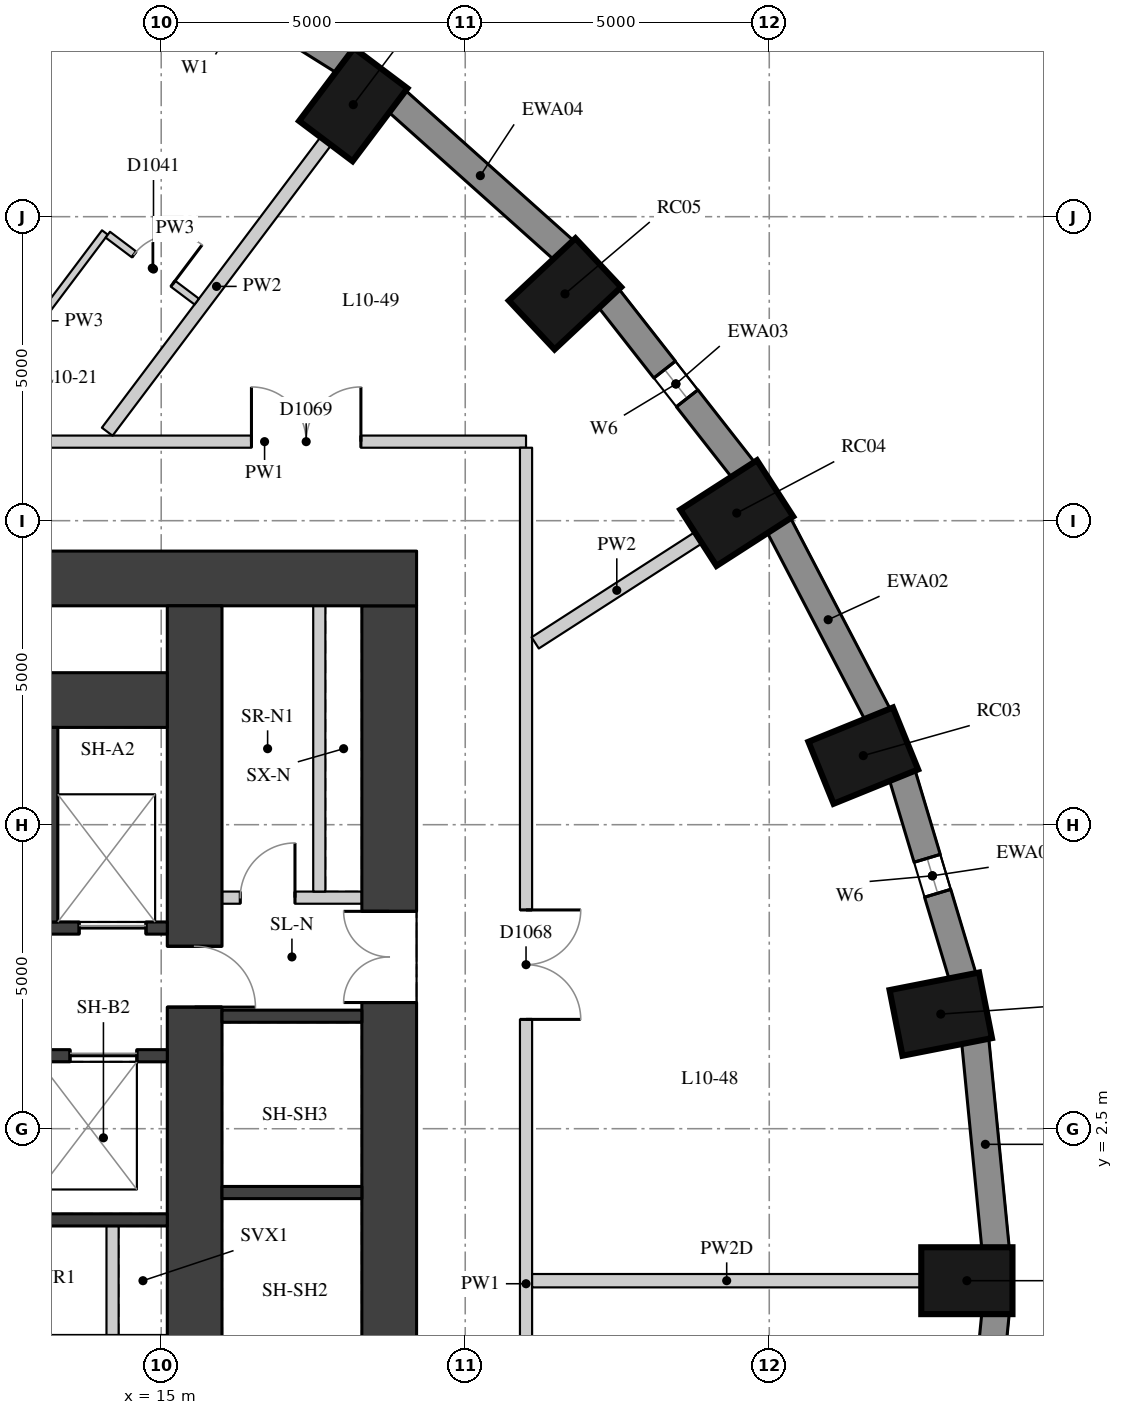
"""IFC4 building model, lengths in metres.
Left out: names, types, materials, properties, quantities, classifications, styles, units other than length and angle.
Written with IfcOpenShell. Run it as: python <this file> out.ifc"""

import sys

from ifc_helpers import new_model, si_unit, direction, frame, frame_2d, origin, origin_2d, place, context, subcontext, project, spatial, rectangle, extrude, element, fill, save


model = new_model("IFC4")
c1 = context("Model", 3, precision=1e-05, world=origin(), true_north=direction((0.0, 1.0)))
c2 = subcontext(c1, "Body", "Model", "MODEL_VIEW")
j1 = project(units=[si_unit("LENGTHUNIT", "METRE"), si_unit("PLANEANGLEUNIT", "RADIAN")], contexts=[c1])
p1 = place(None, origin())
s1 = spatial("IfcSite", under=j1, at=p1, CompositionType="ELEMENT")
p2 = place(p1, origin())
s2 = spatial("IfcBuilding", under=s1, at=p2, CompositionType="ELEMENT")
p3 = place(p2, frame((0.0, 0.0, 41.5)))
s3 = spatial("IfcBuildingStorey", under=s2, at=p3, CompositionType="ELEMENT", Elevation=41.5)
for number, where, z_axis, x_axis in (
    (1, (28.25, 0.0, 0.0), (0.0, 0.0, 1.0), (1.0, 0.0, 0.0)),
    (2, (27.821, 4.385, 0.0), (0.0, 0.0, 1.0), (0.981, 0.193, 0.0)),
    (3, (26.546, 8.636, 0.0), (0.0, 0.0, 1.0), (0.927, 0.376, 0.0)),
    (4, (24.465, 12.625, 0.0), (0.0, 0.0, 1.0), (0.841, 0.541, 0.0)),
    (5, (21.641, 16.23, 0.0), (0.0, 0.0, 1.0), (0.73, 0.683, 0.0)),
    (6, (18.159, 19.343, 0.0), (0.0, 0.0, 1.0), (0.601, 0.799, 0.0)),
):
    element("IfcColumn", number, at=place(p3, frame(where, z_axis=z_axis, x_axis=x_axis)), inside=s3, PredefinedType="COLUMN", context=c2, shape_type="SweptSolid", body=[
        extrude(rectangle(XDim=1.5, YDim=1.1, at=origin_2d()), origin(), (0.0, 0.0, 1.0), 3.3),
    ])
p4 = place(p3, frame((28.722, 0.53, 0.0), z_axis=(0.0, 0.0, 1.0), x_axis=(-0.097389581596, 0.995246336038, 0.0)))
e7 = element("IfcWall", 7, at=p4, inside=s3, PredefinedType="SOLIDWALL", context=c2, shape_type="SweptSolid", body=[
    extrude(rectangle(XDim=3.442, YDim=0.45, at=frame_2d((1.721, 0.0))), origin(), (0.0, 0.0, 1.0), 3.02),
])
p5 = place(p3, frame((28.182, 4.996, 0.0), z_axis=(0.0, 0.0, 1.0), x_axis=(-0.287064133733, 0.957911364963, 0.0)))
e8 = element("IfcWall", 8, at=p5, inside=s3, PredefinedType="SOLIDWALL", context=c2, shape_type="SweptSolid", body=[
    extrude(rectangle(XDim=3.473, YDim=0.45, at=frame_2d((1.737, 0.0))), origin(), (0.0, 0.0, 1.0), 3.02),
])
p6 = place(p5, frame((1.437, 0.0, 0.4)))
e9 = element("IfcOpeningElement", 9, at=p6, cuts=e8, PredefinedType="OPENING", context=c2, shape_type="SweptSolid", body=[
    extrude(rectangle(XDim=0.6, YDim=1.75, at=frame_2d((0.3, 0.875))), frame((0.0, 0.235, 0.0), z_axis=(0.0, -1.0, 0.0), x_axis=(1.0, 0.0, 0.0)), (0.0, 0.0, 1.0), 0.47),
])
p7 = place(p3, frame((26.786, 9.305, 0.0), z_axis=(0.0, 0.0, 1.0), x_axis=(-0.462492775226, 0.886623050041, 0.0)))
e10 = element("IfcWall", 10, at=p7, inside=s3, PredefinedType="SOLIDWALL", context=c2, shape_type="SweptSolid", body=[
    extrude(rectangle(XDim=3.532, YDim=0.45, at=frame_2d((1.766, 0.0))), origin(), (0.0, 0.0, 1.0), 3.02),
])
p8 = place(p3, frame((24.578, 13.328, 0.0), z_axis=(0.0, 0.0, 1.0), x_axis=(-0.616661975264, 0.787228053529, 0.0)))
e11 = element("IfcWall", 11, at=p8, inside=s3, PredefinedType="SOLIDWALL", context=c2, shape_type="SweptSolid", body=[
    extrude(rectangle(XDim=3.61, YDim=0.45, at=frame_2d((1.805, 0.0))), origin(), (0.0, 0.0, 1.0), 3.02),
])
p9 = place(p8, frame((1.505, 0.0, 0.4)))
e12 = element("IfcOpeningElement", 12, at=p9, cuts=e11, PredefinedType="OPENING", context=c2, shape_type="SweptSolid", body=[
    extrude(rectangle(XDim=0.6, YDim=1.75, at=frame_2d((0.3, 0.875))), frame((0.0, 0.235, 0.0), z_axis=(0.0, -1.0, 0.0), x_axis=(1.0, 0.0, 0.0)), (0.0, 0.0, 1.0), 0.47),
])
p10 = place(p3, frame((21.627, 16.943, 0.0), z_axis=(0.0, 0.0, 1.0), x_axis=(-0.745526233716, 0.66647628228, 0.0)))
e13 = element("IfcWall", 13, at=p10, inside=s3, PredefinedType="SOLIDWALL", context=c2, shape_type="SweptSolid", body=[
    extrude(rectangle(XDim=3.697, YDim=0.45, at=frame_2d((1.848, 0.0))), origin(), (0.0, 0.0, 1.0), 3.02),
])
p11 = place(p3, frame((18.023, 20.044, 0.0), z_axis=(0.0, 0.0, 1.0), x_axis=(-0.847635480093, 0.530579016629, 0.0)))
e14 = element("IfcWall", 14, at=p11, inside=s3, PredefinedType="SOLIDWALL", context=c2, shape_type="SweptSolid", body=[
    extrude(rectangle(XDim=3.782, YDim=0.45, at=frame_2d((1.891, 0.0))), origin(), (0.0, 0.0, 1.0), 3.02),
])
p12 = place(p11, frame((0.791, 0.0, 0.4)))
e15 = element("IfcOpeningElement", 15, at=p12, cuts=e14, PredefinedType="OPENING", context=c2, shape_type="SweptSolid", body=[
    extrude(rectangle(XDim=2.2, YDim=1.75, at=frame_2d((1.1, 0.875))), frame((0.0, 0.235, 0.0), z_axis=(0.0, -1.0, 0.0), x_axis=(1.0, 0.0, 0.0)), (0.0, 0.0, 1.0), 0.47),
])
p13 = place(p3, frame((28.387, -3.956, 0.0), z_axis=(0.0, 0.0, 1.0), x_axis=(0.097389581596, 0.995246336038, 0.0)))
e16 = element("IfcWall", 16, at=p13, inside=s3, PredefinedType="SOLIDWALL", context=c2, shape_type="SweptSolid", body=[
    extrude(rectangle(XDim=3.442, YDim=0.45, at=frame_2d((1.721, 0.0))), origin(), (0.0, 0.0, 1.0), 3.02),
])
p14 = place(p13, frame((1.421, 0.0, 0.4)))
e17 = element("IfcOpeningElement", 17, at=p14, cuts=e16, PredefinedType="OPENING", context=c2, shape_type="SweptSolid", body=[
    extrude(rectangle(XDim=0.6, YDim=1.75, at=frame_2d((0.3, 0.875))), frame((0.0, 0.235, 0.0), z_axis=(0.0, -1.0, 0.0), x_axis=(1.0, 0.0, 0.0)), (0.0, 0.0, 1.0), 0.47),
])
p15 = place(p3, frame((18.75, -11.1, 0.0), z_axis=(0.0, 0.0, 1.0), x_axis=(0.0, 1.0, 0.0)))
e18 = element("IfcWall", 18, at=p15, inside=s3, PredefinedType="SHEAR", context=c2, shape_type="SweptSolid", body=[
    extrude(rectangle(XDim=22.2, YDim=0.9, at=frame_2d((11.1, 0.0))), origin(), (0.0, 0.0, 1.0), 3.02),
])
p16 = place(p15, frame((15.675, 0.0, 0.0)))
e19 = element("IfcOpeningElement", 19, at=p16, cuts=e18, PredefinedType="OPENING", context=c2, shape_type="SweptSolid", body=[
    extrude(rectangle(XDim=1.5, YDim=2.1, at=frame_2d((0.75, 1.05))), frame((0.0, 0.46, 0.0), z_axis=(0.0, -1.0, 0.0), x_axis=(1.0, 0.0, 0.0)), (0.0, 0.0, 1.0), 0.92),
])
p17 = place(p15, frame((4.775, 0.0, 0.0)))
e20 = element("IfcOpeningElement", 20, at=p17, cuts=e18, PredefinedType="OPENING", context=c2, shape_type="SweptSolid", body=[
    extrude(rectangle(XDim=1.5, YDim=2.1, at=frame_2d((0.75, 1.05))), frame((0.0, 0.46, 0.0), z_axis=(0.0, -1.0, 0.0), x_axis=(1.0, 0.0, 0.0)), (0.0, 0.0, 1.0), 0.92),
])
p18 = place(p3, frame((4.0, 11.55, 0.0), z_axis=(0.0, 0.0, 1.0), x_axis=(1.0, 0.0, 0.0)))
e21 = element("IfcWall", 21, at=p18, inside=s3, PredefinedType="SHEAR", context=c2, shape_type="SweptSolid", body=[
    extrude(rectangle(XDim=15.2, YDim=0.9, at=frame_2d((7.6, 0.0))), origin(), (0.0, 0.0, 1.0), 3.02),
])
p19 = place(p3, frame((15.55, -11.1, 0.0), z_axis=(0.0, 0.0, 1.0), x_axis=(0.0, 1.0, 0.0)))
e22 = element("IfcWall", 22, at=p19, inside=s3, PredefinedType="SHEAR", context=c2, shape_type="SweptSolid", body=[
    extrude(rectangle(XDim=22.2, YDim=0.9, at=frame_2d((11.1, 0.0))), origin(), (0.0, 0.0, 1.0), 3.02),
])
p20 = place(p19, frame((15.6, 0.0, 0.0)))
e23 = element("IfcOpeningElement", 23, at=p20, cuts=e22, PredefinedType="OPENING", context=c2, shape_type="SweptSolid", body=[
    extrude(rectangle(XDim=1.0, YDim=2.1, at=frame_2d((0.5, 1.05))), frame((0.0, 0.46, 0.0), z_axis=(0.0, -1.0, 0.0), x_axis=(1.0, 0.0, 0.0)), (0.0, 0.0, 1.0), 0.92),
])
p21 = place(p19, frame((5.6, 0.0, 0.0)))
e24 = element("IfcOpeningElement", 24, at=p21, cuts=e22, PredefinedType="OPENING", context=c2, shape_type="SweptSolid", body=[
    extrude(rectangle(XDim=1.0, YDim=2.1, at=frame_2d((0.5, 1.05))), frame((0.0, 0.46, 0.0), z_axis=(0.0, -1.0, 0.0), x_axis=(1.0, 0.0, 0.0)), (0.0, 0.0, 1.0), 0.92),
])
p22 = place(p3, frame((4.9, 9.55, 0.0), z_axis=(0.0, 0.0, 1.0), x_axis=(1.0, 0.0, 0.0)))
e25 = element("IfcWall", 25, at=p22, inside=s3, PredefinedType="SHEAR", context=c2, shape_type="SweptSolid", body=[
    extrude(rectangle(XDim=10.2, YDim=0.9, at=frame_2d((5.1, 0.0))), origin(), (0.0, 0.0, 1.0), 3.02),
])
p23 = place(p3, frame((4.9, 5.8, 0.0), z_axis=(0.0, 0.0, 1.0), x_axis=(1.0, 0.0, 0.0)))
e26 = element("IfcWall", 26, at=p23, inside=s3, PredefinedType="SHEAR", context=c2, shape_type="SweptSolid", body=[
    extrude(rectangle(XDim=10.2, YDim=0.2, at=frame_2d((5.1, 0.0))), origin(), (0.0, 0.0, 1.0), 3.02),
])
p24 = place(p23, frame((6.75, 0.0, 0.0)))
e27 = element("IfcOpeningElement", 27, at=p24, cuts=e26, PredefinedType="OPENING", context=c2, shape_type="SweptSolid", body=[
    extrude(rectangle(XDim=1.1, YDim=2.1, at=frame_2d((0.55, 1.05))), frame((0.0, 0.11, 0.0), z_axis=(0.0, -1.0, 0.0), x_axis=(1.0, 0.0, 0.0)), (0.0, 0.0, 1.0), 0.22),
])
p25 = place(p23, frame((8.75, 0.0, 0.0)))
e28 = element("IfcOpeningElement", 28, at=p25, cuts=e26, PredefinedType="OPENING", context=c2, shape_type="SweptSolid", body=[
    extrude(rectangle(XDim=1.1, YDim=2.1, at=frame_2d((0.55, 1.05))), frame((0.0, 0.11, 0.0), z_axis=(0.0, -1.0, 0.0), x_axis=(1.0, 0.0, 0.0)), (0.0, 0.0, 1.0), 0.22),
])
p26 = place(p3, frame((4.9, 3.7, 0.0), z_axis=(0.0, 0.0, 1.0), x_axis=(1.0, 0.0, 0.0)))
e29 = element("IfcWall", 29, at=p26, inside=s3, PredefinedType="SHEAR", context=c2, shape_type="SweptSolid", body=[
    extrude(rectangle(XDim=10.2, YDim=0.2, at=frame_2d((5.1, 0.0))), origin(), (0.0, 0.0, 1.0), 3.02),
])
p27 = place(p26, frame((6.3, 0.0, 0.0)))
e30 = element("IfcOpeningElement", 30, at=p27, cuts=e29, PredefinedType="OPENING", context=c2, shape_type="SweptSolid", body=[
    extrude(rectangle(XDim=1.1, YDim=2.1, at=frame_2d((0.55, 1.05))), frame((0.0, 0.11, 0.0), z_axis=(0.0, -1.0, 0.0), x_axis=(1.0, 0.0, 0.0)), (0.0, 0.0, 1.0), 0.22),
])
p28 = place(p26, frame((8.6, 0.0, 0.0)))
e31 = element("IfcOpeningElement", 31, at=p28, cuts=e29, PredefinedType="OPENING", context=c2, shape_type="SweptSolid", body=[
    extrude(rectangle(XDim=1.1, YDim=2.1, at=frame_2d((0.55, 1.05))), frame((0.0, 0.11, 0.0), z_axis=(0.0, -1.0, 0.0), x_axis=(1.0, 0.0, 0.0)), (0.0, 0.0, 1.0), 0.22),
])
p29 = place(p3, frame((4.9, 1.0, 0.0), z_axis=(0.0, 0.0, 1.0), x_axis=(1.0, 0.0, 0.0)))
e32 = element("IfcWall", 32, at=p29, inside=s3, PredefinedType="SHEAR", context=c2, shape_type="SweptSolid", body=[
    extrude(rectangle(XDim=10.2, YDim=0.2, at=frame_2d((5.1, 0.0))), origin(), (0.0, 0.0, 1.0), 3.02),
])
p30 = place(p3, frame((13.2, 5.9, 0.0), z_axis=(0.0, 0.0, 1.0), x_axis=(0.0, 1.0, 0.0)))
e33 = element("IfcWall", 33, at=p30, inside=s3, PredefinedType="SHEAR", context=c2, shape_type="SweptSolid", body=[
    extrude(rectangle(XDim=3.2, YDim=0.2, at=frame_2d((1.6, 0.0))), origin(), (0.0, 0.0, 1.0), 3.02),
])
p31 = place(p3, frame((14.2, -0.9, 0.0), z_axis=(0.0, 0.0, 1.0), x_axis=(0.0, 1.0, 0.0)))
e34 = element("IfcWall", 34, at=p31, inside=s3, PredefinedType="PARTITIONING", context=c2, shape_type="SweptSolid", body=[
    extrude(rectangle(XDim=1.8, YDim=0.2, at=frame_2d((0.9, 0.0))), origin(), (0.0, 0.0, 1.0), 3.02),
])
for number, where, z_axis, x_axis in (
    (35, (16.0, 1.45, 0.0), (0.0, 0.0, 1.0), (1.0, 0.0, 0.0)),
    (36, (16.0, 4.35, 0.0), (0.0, 0.0, 1.0), (1.0, 0.0, 0.0)),
):
    element("IfcWall", number, at=place(p3, frame(where, z_axis=z_axis, x_axis=x_axis)), inside=s3, PredefinedType="SHEAR", context=c2, shape_type="SweptSolid", body=[
        extrude(rectangle(XDim=2.3, YDim=0.2, at=frame_2d((1.15, 0.0))), origin(), (0.0, 0.0, 1.0), 3.02),
    ])
p32 = place(p3, frame((16.0, 6.3, 0.0), z_axis=(0.0, 0.0, 1.0), x_axis=(1.0, 0.0, 0.0)))
e37 = element("IfcWall", 37, at=p32, inside=s3, PredefinedType="PARTITIONING", context=c2, shape_type="SweptSolid", body=[
    extrude(rectangle(XDim=2.3, YDim=0.2, at=frame_2d((1.15, 0.0))), origin(), (0.0, 0.0, 1.0), 3.02),
])
p33 = place(p32, frame((0.3, 0.0, 0.0)))
e38 = element("IfcOpeningElement", 38, at=p33, cuts=e37, PredefinedType="OPENING", context=c2, shape_type="SweptSolid", body=[
    extrude(rectangle(XDim=0.9, YDim=2.1, at=frame_2d((0.45, 1.05))), frame((0.0, 0.11, 0.0), z_axis=(0.0, -1.0, 0.0), x_axis=(1.0, 0.0, 0.0)), (0.0, 0.0, 1.0), 0.22),
])
p34 = place(p3, frame((17.6, 6.4, 0.0), z_axis=(0.0, 0.0, 1.0), x_axis=(0.0, 1.0, 0.0)))
e39 = element("IfcWall", 39, at=p34, inside=s3, PredefinedType="PARTITIONING", context=c2, shape_type="SweptSolid", body=[
    extrude(rectangle(XDim=4.7, YDim=0.2, at=frame_2d((2.35, 0.0))), origin(), (0.0, 0.0, 1.0), 3.02),
])
p35 = place(p3, frame((12.4, 13.8, 0.0), z_axis=(0.0, 0.0, 1.0), x_axis=(1.0, 0.0, 0.0)))
e40 = element("IfcWall", 40, at=p35, inside=s3, PredefinedType="PARTITIONING", context=c2, shape_type="SweptSolid", body=[
    extrude(rectangle(XDim=8.6, YDim=0.2, at=frame_2d((4.3, 0.0))), origin(), (0.0, 0.0, 1.0), 3.02),
])
p36 = place(p35, frame((4.084, 0.0, 0.0)))
e41 = element("IfcOpeningElement", 41, at=p36, cuts=e40, PredefinedType="OPENING", context=c2, shape_type="SweptSolid", body=[
    extrude(rectangle(XDim=1.8, YDim=2.1, at=frame_2d((0.9, 1.05))), frame((0.0, 0.11, 0.0), z_axis=(0.0, -1.0, 0.0), x_axis=(1.0, 0.0, 0.0)), (0.0, 0.0, 1.0), 0.22),
])
p37 = place(p3, frame((21.0, 13.7, 0.0), z_axis=(0.0, 0.0, 1.0), x_axis=(0.0, -1.0, 0.0)))
e42 = element("IfcWall", 42, at=p37, inside=s3, PredefinedType="PARTITIONING", context=c2, shape_type="SweptSolid", body=[
    extrude(rectangle(XDim=27.5, YDim=0.2, at=frame_2d((13.75, 0.0))), origin(), (0.0, 0.0, 1.0), 3.02),
])
p38 = place(p37, frame((15.992, 0.0, 0.0)))
e43 = element("IfcOpeningElement", 43, at=p38, cuts=e42, PredefinedType="OPENING", context=c2, shape_type="SweptSolid", body=[
    extrude(rectangle(XDim=1.8, YDim=2.1, at=frame_2d((0.9, 1.05))), frame((0.0, 0.11, 0.0), z_axis=(0.0, -1.0, 0.0), x_axis=(1.0, 0.0, 0.0)), (0.0, 0.0, 1.0), 0.22),
])
p39 = place(p37, frame((7.602, 0.0, 0.0)))
e44 = element("IfcOpeningElement", 44, at=p39, cuts=e42, PredefinedType="OPENING", context=c2, shape_type="SweptSolid", body=[
    extrude(rectangle(XDim=1.8, YDim=2.1, at=frame_2d((0.9, 1.05))), frame((0.0, 0.11, 0.0), z_axis=(0.0, -1.0, 0.0), x_axis=(1.0, 0.0, 0.0)), (0.0, 0.0, 1.0), 0.22),
])
p40 = place(p3, frame((27.5, 0.0, 0.0), z_axis=(0.0, 0.0, 1.0), x_axis=(-1.0, 0.0, 0.0)))
e45 = element("IfcWall", 45, at=p40, inside=s3, PredefinedType="PARTITIONING", context=c2, shape_type="SweptSolid", body=[
    extrude(rectangle(XDim=6.4, YDim=0.22, at=frame_2d((3.2, 0.0))), origin(), (0.0, 0.0, 1.0), 2.47),
])
p41 = place(p3, frame((23.835, 12.219, 0.0), z_axis=(0.0, 0.0, 1.0), x_axis=(-0.840711059677, -0.541483992503, 0.0)))
e46 = element("IfcWall", 46, at=p41, inside=s3, PredefinedType="PARTITIONING", context=c2, shape_type="SweptSolid", body=[
    extrude(rectangle(XDim=3.193, YDim=0.22, at=frame_2d((1.596, 0.0))), origin(), (0.0, 0.0, 1.0), 3.02),
])
p42 = place(p3, frame((17.708, 18.743, 0.0), z_axis=(0.0, 0.0, 1.0), x_axis=(-0.601181461694, -0.799112539081, 0.0)))
e47 = element("IfcWall", 47, at=p42, inside=s3, PredefinedType="PARTITIONING", context=c2, shape_type="SweptSolid", body=[
    extrude(rectangle(XDim=5.981, YDim=0.22, at=frame_2d((2.99, 0.0))), origin(), (0.0, 0.0, 1.0), 3.02),
])
p43 = place(p3, frame((11.889, 14.336, 0.0), z_axis=(0.0, 0.0, 1.0), x_axis=(0.601160173805, 0.799128553758, 0.0)))
e48 = element("IfcWall", 48, at=p43, inside=s3, PredefinedType="PARTITIONING", context=c2, shape_type="SweptSolid", body=[
    extrude(rectangle(XDim=3.634, YDim=0.12, at=frame_2d((1.817, 0.0))), origin(), (0.0, 0.0, 1.0), 3.02),
])
p44 = place(p3, frame((14.122, 17.204, 0.0), z_axis=(0.0, 0.0, 1.0), x_axis=(0.799134663307, -0.601152052231, 0.0)))
e49 = element("IfcWall", 49, at=p44, inside=s3, PredefinedType="PARTITIONING", context=c2, shape_type="SweptSolid", body=[
    extrude(rectangle(XDim=1.83, YDim=0.12, at=frame_2d((0.915, 0.0))), origin(), (0.0, 0.0, 1.0), 3.02),
])
p45 = place(p44, frame((0.54, 0.0, 0.0)))
e50 = element("IfcOpeningElement", 50, at=p45, cuts=e49, PredefinedType="OPENING", context=c2, shape_type="SweptSolid", body=[
    extrude(rectangle(XDim=0.8, YDim=2.1, at=frame_2d((0.4, 1.05))), frame((0.0, 0.07, 0.0), z_axis=(0.0, -1.0, 0.0), x_axis=(1.0, 0.0, 0.0)), (0.0, 0.0, 1.0), 0.14),
])
p46 = place(p6, origin())
e51 = element("IfcWindow", 51, at=p46, inside=s3, PartitioningType="SINGLE_PANEL", PredefinedType="WINDOW", context=c2, shape_type="SweptSolid", body=[
    extrude(rectangle(XDim=0.6, YDim=1.75, at=frame_2d((0.3, 0.875))), frame((0.0, 0.035, 0.0), z_axis=(0.0, -1.0, 0.0), x_axis=(1.0, 0.0, 0.0)), (0.0, 0.0, 1.0), 0.06),
])
fill(e9, e51)
p47 = place(p9, origin())
e52 = element("IfcWindow", 52, at=p47, inside=s3, PartitioningType="SINGLE_PANEL", PredefinedType="WINDOW", context=c2, shape_type="SweptSolid", body=[
    extrude(rectangle(XDim=0.6, YDim=1.75, at=frame_2d((0.3, 0.875))), frame((0.0, 0.035, 0.0), z_axis=(0.0, -1.0, 0.0), x_axis=(1.0, 0.0, 0.0)), (0.0, 0.0, 1.0), 0.06),
])
fill(e12, e52)
p48 = place(p16, origin())
e53 = element("IfcDoor", 53, at=p48, inside=s3, OperationType="DOUBLE_DOOR_SINGLE_SWING", PredefinedType="DOOR", context=c2, shape_type="SweptSolid", body=[
    extrude(rectangle(XDim=1.5, YDim=2.1, at=frame_2d((0.75, 1.05))), frame((0.0, 0.025, 0.0), z_axis=(0.0, -1.0, 0.0), x_axis=(1.0, 0.0, 0.0)), (0.0, 0.0, 1.0), 0.05),
])
fill(e19, e53)
p49 = place(p25, origin())
e54 = element("IfcDoor", 54, at=p49, inside=s3, OperationType="DOUBLE_DOOR_SLIDING", PredefinedType="DOOR", context=c2, shape_type="SweptSolid", body=[
    extrude(rectangle(XDim=1.1, YDim=2.1, at=frame_2d((0.55, 1.05))), frame((0.0, 0.025, 0.0), z_axis=(0.0, -1.0, 0.0), x_axis=(1.0, 0.0, 0.0)), (0.0, 0.0, 1.0), 0.05),
])
fill(e28, e54)
p50 = place(p28, origin())
e55 = element("IfcDoor", 55, at=p50, inside=s3, OperationType="DOUBLE_DOOR_SLIDING", PredefinedType="DOOR", context=c2, shape_type="SweptSolid", body=[
    extrude(rectangle(XDim=1.1, YDim=2.1, at=frame_2d((0.55, 1.05))), frame((0.0, 0.025, 0.0), z_axis=(0.0, -1.0, 0.0), x_axis=(1.0, 0.0, 0.0)), (0.0, 0.0, 1.0), 0.05),
])
fill(e31, e55)
p51 = place(p20, origin())
e56 = element("IfcDoor", 56, at=p51, inside=s3, OperationType="SINGLE_SWING_RIGHT", PredefinedType="DOOR", context=c2, shape_type="SweptSolid", body=[
    extrude(rectangle(XDim=1.0, YDim=2.1, at=frame_2d((0.5, 1.05))), frame((0.0, 0.025, 0.0), z_axis=(0.0, -1.0, 0.0), x_axis=(1.0, 0.0, 0.0)), (0.0, 0.0, 1.0), 0.05),
])
fill(e23, e56)
p52 = place(p33, origin())
e57 = element("IfcDoor", 57, at=p52, inside=s3, OperationType="SINGLE_SWING_RIGHT", PredefinedType="DOOR", context=c2, shape_type="SweptSolid", body=[
    extrude(rectangle(XDim=0.9, YDim=2.1, at=frame_2d((0.45, 1.05))), frame((0.0, 0.025, 0.0), z_axis=(0.0, -1.0, 0.0), x_axis=(1.0, 0.0, 0.0)), (0.0, 0.0, 1.0), 0.05),
])
fill(e38, e57)
p53 = place(p45, origin())
e58 = element("IfcDoor", 58, at=p53, inside=s3, OperationType="SINGLE_SWING_RIGHT", PredefinedType="DOOR", context=c2, shape_type="SweptSolid", body=[
    extrude(rectangle(XDim=0.8, YDim=2.1, at=frame_2d((0.4, 1.05))), frame((0.0, 0.025, 0.0), z_axis=(0.0, -1.0, 0.0), x_axis=(1.0, 0.0, 0.0)), (0.0, 0.0, 1.0), 0.05),
])
fill(e50, e58)
p54 = place(p39, origin())
e59 = element("IfcDoor", 59, at=p54, inside=s3, OperationType="DOUBLE_DOOR_SINGLE_SWING", PredefinedType="DOOR", context=c2, shape_type="SweptSolid", body=[
    extrude(rectangle(XDim=1.8, YDim=2.1, at=frame_2d((0.9, 1.05))), frame((0.0, 0.025, 0.0), z_axis=(0.0, -1.0, 0.0), x_axis=(1.0, 0.0, 0.0)), (0.0, 0.0, 1.0), 0.05),
])
fill(e44, e59)
p55 = place(p36, origin())
e60 = element("IfcDoor", 60, at=p55, inside=s3, OperationType="DOUBLE_DOOR_SINGLE_SWING", PredefinedType="DOOR", context=c2, shape_type="SweptSolid", body=[
    extrude(rectangle(XDim=1.8, YDim=2.1, at=frame_2d((0.9, 1.05))), frame((0.0, 0.025, 0.0), z_axis=(0.0, -1.0, 0.0), x_axis=(1.0, 0.0, 0.0)), (0.0, 0.0, 1.0), 0.05),
])
fill(e41, e60)
save(model, sys.argv[1])
